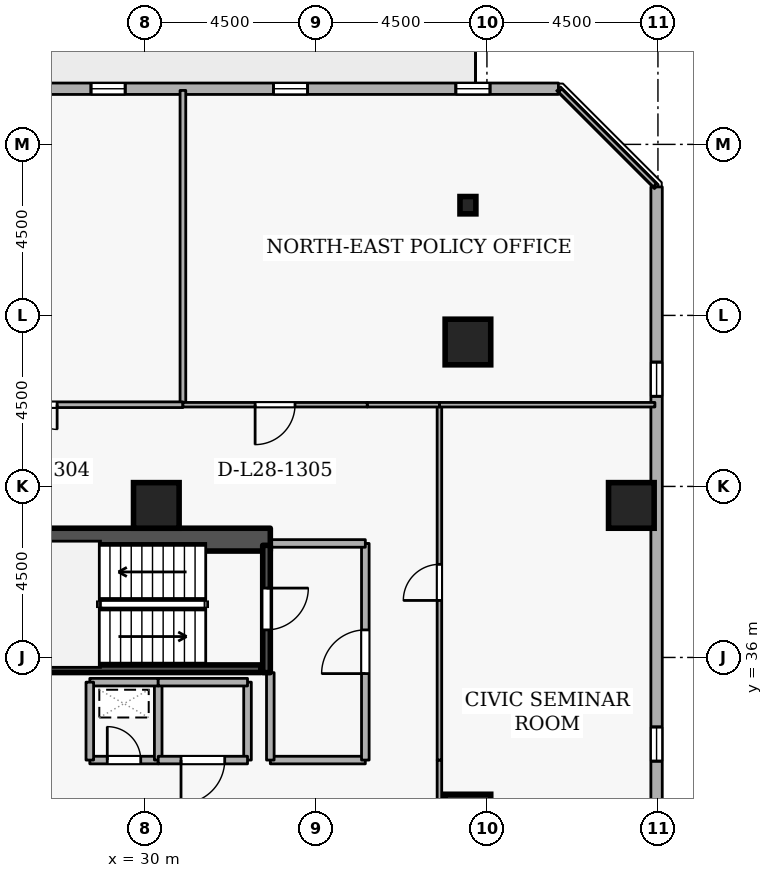
"""IFC4 building model, lengths in metres.
Left out: names, types, materials, properties, quantities, classifications, styles, units other than length and angle.
Written with IfcOpenShell. Run it as: python <this file> out.ifc"""

import sys

from ifc_helpers import new_model, si_unit, direction, frame, frame_2d, origin, origin_2d, place, context, subcontext, project, spatial, rectangle, i_section, extrude, element, fill, save


model = new_model("IFC4")
c1 = context("Model", 3, precision=1e-05, world=origin(), true_north=direction((0.0, 1.0)))
c2 = subcontext(c1, "Body", "Model", "MODEL_VIEW")
j1 = project(units=[si_unit("LENGTHUNIT", "METRE"), si_unit("PLANEANGLEUNIT", "RADIAN")], contexts=[c1])
p1 = place(None, origin())
s1 = spatial("IfcSite", under=j1, at=p1, CompositionType="ELEMENT")
p2 = place(p1, origin())
s2 = spatial("IfcBuilding", under=s1, at=p2, CompositionType="ELEMENT")
p3 = place(p2, frame((0.0, 0.0, 108.9)))
s3 = spatial("IfcBuildingStorey", under=s2, at=p3, CompositionType="ELEMENT", Elevation=108.9)
p4 = place(p3, frame((17.7, 39.1, 0.0), z_axis=(0.0, 0.0, 1.0), x_axis=(1.0, 0.0, 0.0)))
e1 = element("IfcWall", 1, at=p4, inside=s3, PredefinedType="SHEAR", context=c2, shape_type="SweptSolid", body=[
    extrude(rectangle(XDim=15.6, YDim=0.6, at=frame_2d((7.8, 0.0))), origin(), (0.0, 0.0, 1.0), 3.6),
])
for number, where, z_axis, x_axis in (
    (2, (42.8, 40.0, 0.0), (0.0, 0.0, 1.0), (1.0, 0.0, 0.0)),
    (3, (38.5, 44.3, 0.0), (0.0, 0.0, 1.0), (1.0, 0.0, 0.0)),
    (4, (38.5, 31.8, 0.0), (0.0, 0.0, 1.0), (1.0, 0.0, 0.0)),
    (5, (30.3, 40.0, 0.0), (0.0, 0.0, 1.0), (1.0, 0.0, 0.0)),
):
    element("IfcColumn", number, at=place(p3, frame(where, z_axis=z_axis, x_axis=x_axis)), inside=s3, PredefinedType="COLUMN", context=c2, shape_type="SweptSolid", body=[
        extrude(rectangle(XDim=1.2, YDim=1.2, at=origin_2d()), origin(), (0.0, 0.0, 1.0), 3.6),
    ])
p5 = place(p3, frame((38.5, 47.9, 0.0), z_axis=(0.0, 0.0, 1.0), x_axis=(1.0, 0.0, 0.0)))
e6 = element("IfcColumn", 6, at=p5, inside=s3, PredefinedType="COLUMN", context=c2, shape_type="SweptSolid", body=[
    extrude(i_section(OverallWidth=0.418, OverallDepth=0.456, WebThickness=0.042, FlangeThickness=0.067, FilletRadius=0.015, at=origin_2d()), origin(), (0.0, 0.0, 1.0), 3.6),
])
p6 = place(p3, frame((43.463, 12.271, 0.0), z_axis=(0.0, 0.0, 1.0), x_axis=(5.4088042e-05, 0.999999998537, 0.0)))
e7 = element("IfcWall", 7, at=p6, inside=s3, PredefinedType="STANDARD", context=c2, shape_type="SweptSolid", body=[
    extrude(rectangle(XDim=36.11, YDim=0.3, at=frame_2d((18.055, 0.0))), origin(), (0.0, 0.0, 1.0), 2.7),
])
p7 = place(p6, frame((6.6, 0.0, 0.72)))
e8 = element("IfcOpeningElement", 8, at=p7, cuts=e7, PredefinedType="OPENING", context=c2, shape_type="SweptSolid", body=[
    extrude(rectangle(XDim=0.9, YDim=1.75, at=frame_2d((0.45, 0.875))), frame((0.0, 0.16, 0.0), z_axis=(0.0, -1.0, 0.0), x_axis=(1.0, 0.0, 0.0)), (0.0, 0.0, 1.0), 0.32),
])
p8 = place(p6, frame((11.4, 0.0, 0.72)))
e9 = element("IfcOpeningElement", 9, at=p8, cuts=e7, PredefinedType="OPENING", context=c2, shape_type="SweptSolid", body=[
    extrude(rectangle(XDim=0.9, YDim=1.75, at=frame_2d((0.45, 0.875))), frame((0.0, 0.16, 0.0), z_axis=(0.0, -1.0, 0.0), x_axis=(1.0, 0.0, 0.0)), (0.0, 0.0, 1.0), 0.32),
])
p9 = place(p6, frame((16.2, 0.0, 0.72)))
e10 = element("IfcOpeningElement", 10, at=p9, cuts=e7, PredefinedType="OPENING", context=c2, shape_type="SweptSolid", body=[
    extrude(rectangle(XDim=0.9, YDim=1.75, at=frame_2d((0.45, 0.875))), frame((0.0, 0.16, 0.0), z_axis=(0.0, -1.0, 0.0), x_axis=(1.0, 0.0, 0.0)), (0.0, 0.0, 1.0), 0.32),
])
p10 = place(p6, frame((21.0, 0.0, 0.72)))
e11 = element("IfcOpeningElement", 11, at=p10, cuts=e7, PredefinedType="OPENING", context=c2, shape_type="SweptSolid", body=[
    extrude(rectangle(XDim=0.9, YDim=1.75, at=frame_2d((0.45, 0.875))), frame((0.0, 0.16, 0.0), z_axis=(0.0, -1.0, 0.0), x_axis=(1.0, 0.0, 0.0)), (0.0, 0.0, 1.0), 0.32),
])
p11 = place(p6, frame((30.6, 0.0, 0.72)))
e12 = element("IfcOpeningElement", 12, at=p11, cuts=e7, PredefinedType="OPENING", context=c2, shape_type="SweptSolid", body=[
    extrude(rectangle(XDim=0.9, YDim=1.75, at=frame_2d((0.45, 0.875))), frame((0.0, 0.16, 0.0), z_axis=(0.0, -1.0, 0.0), x_axis=(1.0, 0.0, 0.0)), (0.0, 0.0, 1.0), 0.32),
])
p12 = place(p3, frame((40.881, 50.965, 0.0), z_axis=(0.0, 0.0, 1.0), x_axis=(-0.999999998537, -5.4088042e-05, 0.0)))
e13 = element("IfcWall", 13, at=p12, inside=s3, PredefinedType="STANDARD", context=c2, shape_type="SweptSolid", body=[
    extrude(rectangle(XDim=36.11, YDim=0.3, at=frame_2d((18.055, 0.0))), origin(), (0.0, 0.0, 1.0), 2.7),
])
p13 = place(p12, frame((19.405, 0.0, 0.0)))
e14 = element("IfcOpeningElement", 14, at=p13, cuts=e13, PredefinedType="OPENING", context=c2, shape_type="SweptSolid", body=[
    extrude(rectangle(XDim=1.0, YDim=2.08, at=frame_2d((0.5, 1.04))), frame((0.0, 0.16, 0.0), z_axis=(0.0, -1.0, 0.0), x_axis=(1.0, 0.0, 0.0)), (0.0, 0.0, 1.0), 0.32),
])
p14 = place(p12, frame((1.8, 0.0, 0.72)))
e15 = element("IfcOpeningElement", 15, at=p14, cuts=e13, PredefinedType="OPENING", context=c2, shape_type="SweptSolid", body=[
    extrude(rectangle(XDim=0.9, YDim=1.75, at=frame_2d((0.45, 0.875))), frame((0.0, 0.16, 0.0), z_axis=(0.0, -1.0, 0.0), x_axis=(1.0, 0.0, 0.0)), (0.0, 0.0, 1.0), 0.32),
])
p15 = place(p12, frame((6.6, 0.0, 0.72)))
e16 = element("IfcOpeningElement", 16, at=p15, cuts=e13, PredefinedType="OPENING", context=c2, shape_type="SweptSolid", body=[
    extrude(rectangle(XDim=0.9, YDim=1.75, at=frame_2d((0.45, 0.875))), frame((0.0, 0.16, 0.0), z_axis=(0.0, -1.0, 0.0), x_axis=(1.0, 0.0, 0.0)), (0.0, 0.0, 1.0), 0.32),
])
p16 = place(p12, frame((11.4, 0.0, 0.72)))
e17 = element("IfcOpeningElement", 17, at=p16, cuts=e13, PredefinedType="OPENING", context=c2, shape_type="SweptSolid", body=[
    extrude(rectangle(XDim=0.9, YDim=1.75, at=frame_2d((0.45, 0.875))), frame((0.0, 0.16, 0.0), z_axis=(0.0, -1.0, 0.0), x_axis=(1.0, 0.0, 0.0)), (0.0, 0.0, 1.0), 0.32),
])
p17 = place(p12, frame((16.2, 0.0, 0.72)))
e18 = element("IfcOpeningElement", 18, at=p17, cuts=e13, PredefinedType="OPENING", context=c2, shape_type="SweptSolid", body=[
    extrude(rectangle(XDim=0.9, YDim=1.75, at=frame_2d((0.45, 0.875))), frame((0.0, 0.16, 0.0), z_axis=(0.0, -1.0, 0.0), x_axis=(1.0, 0.0, 0.0)), (0.0, 0.0, 1.0), 0.32),
])
p18 = place(p12, frame((25.8, 0.0, 0.72)))
e19 = element("IfcOpeningElement", 19, at=p18, cuts=e13, PredefinedType="OPENING", context=c2, shape_type="SweptSolid", body=[
    extrude(rectangle(XDim=0.9, YDim=1.75, at=frame_2d((0.45, 0.875))), frame((0.0, 0.16, 0.0), z_axis=(0.0, -1.0, 0.0), x_axis=(1.0, 0.0, 0.0)), (0.0, 0.0, 1.0), 0.32),
])
p19 = place(p12, frame((30.6, 0.0, 0.72)))
e20 = element("IfcOpeningElement", 20, at=p19, cuts=e13, PredefinedType="OPENING", context=c2, shape_type="SweptSolid", body=[
    extrude(rectangle(XDim=0.9, YDim=1.75, at=frame_2d((0.45, 0.875))), frame((0.0, 0.16, 0.0), z_axis=(0.0, -1.0, 0.0), x_axis=(1.0, 0.0, 0.0)), (0.0, 0.0, 1.0), 0.32),
])
p20 = place(p3, frame((33.2, 38.95, 0.0), z_axis=(0.0, 0.0, 1.0), x_axis=(0.0, -1.0, 0.0)))
e21 = element("IfcWall", 21, at=p20, inside=s3, PredefinedType="SHEAR", context=c2, shape_type="SweptSolid", body=[
    extrude(rectangle(XDim=3.35, YDim=0.2, at=frame_2d((1.675, 0.0))), origin(), (0.0, 0.0, 1.0), 3.6),
])
p21 = place(p20, frame((1.125, 0.0, 0.0)))
e22 = element("IfcOpeningElement", 22, at=p21, cuts=e21, PredefinedType="OPENING", context=c2, shape_type="SweptSolid", body=[
    extrude(rectangle(XDim=1.1, YDim=2.1, at=frame_2d((0.55, 1.05))), frame((0.0, 0.11, 0.0), z_axis=(0.0, -1.0, 0.0), x_axis=(1.0, 0.0, 0.0)), (0.0, 0.0, 1.0), 0.22),
])
p22 = place(p3, frame((25.95, 35.703, 0.0), z_axis=(0.0, 0.0, 1.0), x_axis=(1.0, 0.0, 0.0)))
e23 = element("IfcWall", 23, at=p22, inside=s3, PredefinedType="SHEAR", context=c2, shape_type="SweptSolid", body=[
    extrude(rectangle(XDim=7.1, YDim=0.2, at=frame_2d((3.55, 0.0))), origin(), (0.0, 0.0, 1.0), 3.6),
])
p23 = place(p3, frame((33.3, 33.3, 0.0), z_axis=(0.0, 0.0, 1.0), x_axis=(1.0, 0.0, 0.0)))
e24 = element("IfcWall", 24, at=p23, inside=s3, PredefinedType="STANDARD", context=c2, shape_type="SweptSolid", body=[
    extrude(rectangle(XDim=2.5, YDim=0.2, at=frame_2d((1.25, 0.0))), origin(), (0.0, 0.0, 1.0), 3.34),
])
p24 = place(p3, frame((35.8, 33.3, 0.0), z_axis=(0.0, 0.0, 1.0), x_axis=(0.0, 1.0, 0.0)))
e25 = element("IfcWall", 25, at=p24, inside=s3, PredefinedType="STANDARD", context=c2, shape_type="SweptSolid", body=[
    extrude(rectangle(XDim=5.7, YDim=0.2, at=frame_2d((2.85, 0.0))), origin(), (0.0, 0.0, 1.0), 3.34),
])
p25 = place(p24, frame((2.275, 0.0, 0.0)))
e26 = element("IfcOpeningElement", 26, at=p25, cuts=e25, PredefinedType="OPENING", context=c2, shape_type="SweptSolid", body=[
    extrude(rectangle(XDim=1.15, YDim=2.1, at=frame_2d((0.575, 1.05))), frame((0.0, 0.11, 0.0), z_axis=(0.0, -1.0, 0.0), x_axis=(1.0, 0.0, 0.0)), (0.0, 0.0, 1.0), 0.22),
])
p26 = place(p3, frame((35.8, 39.0, 0.0), z_axis=(0.0, 0.0, 1.0), x_axis=(-1.0, 0.0, 0.0)))
e27 = element("IfcWall", 27, at=p26, inside=s3, PredefinedType="STANDARD", context=c2, shape_type="SweptSolid", body=[
    extrude(rectangle(XDim=2.5, YDim=0.2, at=frame_2d((1.25, 0.0))), origin(), (0.0, 0.0, 1.0), 3.34),
])
p27 = place(p3, frame((33.3, 35.6, 0.0), z_axis=(0.0, 0.0, 1.0), x_axis=(0.0, -1.0, 0.0)))
e28 = element("IfcWall", 28, at=p27, inside=s3, PredefinedType="STANDARD", context=c2, shape_type="SweptSolid", body=[
    extrude(rectangle(XDim=2.3, YDim=0.2, at=frame_2d((1.15, 0.0))), origin(), (0.0, 0.0, 1.0), 2.545),
])
p28 = place(p3, frame((28.55, 33.3, 0.0), z_axis=(0.0, 0.0, 1.0), x_axis=(1.0, 0.0, 0.0)))
e29 = element("IfcWall", 29, at=p28, inside=s3, PredefinedType="STANDARD", context=c2, shape_type="SweptSolid", body=[
    extrude(rectangle(XDim=1.8, YDim=0.2, at=frame_2d((0.9, 0.0))), origin(), (0.0, 0.0, 1.0), 3.34),
])
p29 = place(p28, frame((0.46, 0.0, 0.0)))
e30 = element("IfcOpeningElement", 30, at=p29, cuts=e29, PredefinedType="OPENING", context=c2, shape_type="SweptSolid", body=[
    extrude(rectangle(XDim=0.88, YDim=2.04, at=frame_2d((0.44, 1.02))), frame((0.0, 0.11, 0.0), z_axis=(0.0, -1.0, 0.0), x_axis=(1.0, 0.0, 0.0)), (0.0, 0.0, 1.0), 0.22),
])
p30 = place(p3, frame((30.35, 33.3, 0.0), z_axis=(0.0, 0.0, 1.0), x_axis=(0.0, 1.0, 0.0)))
e31 = element("IfcWall", 31, at=p30, inside=s3, PredefinedType="STANDARD", context=c2, shape_type="SweptSolid", body=[
    extrude(rectangle(XDim=2.05, YDim=0.2, at=frame_2d((1.025, 0.0))), origin(), (0.0, 0.0, 1.0), 3.34),
])
p31 = place(p3, frame((30.35, 35.35, 0.0), z_axis=(0.0, 0.0, 1.0), x_axis=(-1.0, 0.0, 0.0)))
e32 = element("IfcWall", 32, at=p31, inside=s3, PredefinedType="STANDARD", context=c2, shape_type="SweptSolid", body=[
    extrude(rectangle(XDim=1.8, YDim=0.2, at=frame_2d((0.9, 0.0))), origin(), (0.0, 0.0, 1.0), 3.34),
])
p32 = place(p3, frame((28.55, 35.35, 0.0), z_axis=(0.0, 0.0, 1.0), x_axis=(0.0, -1.0, 0.0)))
e33 = element("IfcWall", 33, at=p32, inside=s3, PredefinedType="STANDARD", context=c2, shape_type="SweptSolid", body=[
    extrude(rectangle(XDim=2.05, YDim=0.2, at=frame_2d((1.025, 0.0))), origin(), (0.0, 0.0, 1.0), 3.34),
])
p33 = place(p3, frame((32.7, 35.35, 0.0), z_axis=(0.0, 0.0, 1.0), x_axis=(0.0, -1.0, 0.0)))
e34 = element("IfcWall", 34, at=p33, inside=s3, PredefinedType="STANDARD", context=c2, shape_type="SweptSolid", body=[
    extrude(rectangle(XDim=2.05, YDim=0.2, at=frame_2d((1.025, 0.0))), origin(), (0.0, 0.0, 1.0), 2.545),
])
p34 = place(p3, frame((32.7, 33.3, 0.0), z_axis=(0.0, 0.0, 1.0), x_axis=(-1.0, 0.0, 0.0)))
e35 = element("IfcWall", 35, at=p34, inside=s3, PredefinedType="STANDARD", context=c2, shape_type="SweptSolid", body=[
    extrude(rectangle(XDim=2.35, YDim=0.2, at=frame_2d((1.175, 0.0))), origin(), (0.0, 0.0, 1.0), 3.34),
])
p35 = place(p34, frame((0.6, 0.0, 0.0)))
e36 = element("IfcOpeningElement", 36, at=p35, cuts=e35, PredefinedType="OPENING", context=c2, shape_type="SweptSolid", body=[
    extrude(rectangle(XDim=1.15, YDim=2.1, at=frame_2d((0.575, 1.05))), frame((0.0, 0.11, 0.0), z_axis=(0.0, -1.0, 0.0), x_axis=(1.0, 0.0, 0.0)), (0.0, 0.0, 1.0), 0.22),
])
p36 = place(p3, frame((30.35, 35.35, 0.0), z_axis=(0.0, 0.0, 1.0), x_axis=(1.0, 0.0, 0.0)))
e37 = element("IfcWall", 37, at=p36, inside=s3, PredefinedType="STANDARD", context=c2, shape_type="SweptSolid", body=[
    extrude(rectangle(XDim=2.35, YDim=0.2, at=frame_2d((1.175, 0.0))), origin(), (0.0, 0.0, 1.0), 3.34),
])
p37 = place(p3, frame((37.75, 31.45, 0.0), z_axis=(0.0, 0.0, 1.0), x_axis=(0.0, 1.0, 0.0)))
e38 = element("IfcWall", 38, at=p37, inside=s3, PredefinedType="PARTITIONING", context=c2, shape_type="SweptSolid", body=[
    extrude(rectangle(XDim=1.85, YDim=0.12, at=frame_2d((0.925, 0.0))), origin(), (0.0, 0.0, 1.0), 3.34),
])
p38 = place(p3, frame((37.75, 33.3, 0.0), z_axis=(0.0, 0.0, 1.0), x_axis=(0.0, 1.0, 0.0)))
e39 = element("IfcWall", 39, at=p38, inside=s3, PredefinedType="PARTITIONING", context=c2, shape_type="SweptSolid", body=[
    extrude(rectangle(XDim=9.35, YDim=0.12, at=frame_2d((4.675, 0.0))), origin(), (0.0, 0.0, 1.0), 3.34),
])
p39 = place(p38, frame((4.2, 0.0, 0.0)))
e40 = element("IfcOpeningElement", 40, at=p39, cuts=e39, PredefinedType="OPENING", context=c2, shape_type="SweptSolid", body=[
    extrude(rectangle(XDim=0.95, YDim=2.1, at=frame_2d((0.475, 1.05))), frame((0.0, 0.07, 0.0), z_axis=(0.0, -1.0, 0.0), x_axis=(1.0, 0.0, 0.0)), (0.0, 0.0, 1.0), 0.14),
])
p40 = place(p3, frame((37.75, 42.65, 0.0), z_axis=(0.0, 0.0, 1.0), x_axis=(1.0, 0.0, 0.0)))
e41 = element("IfcWall", 41, at=p40, inside=s3, PredefinedType="PARTITIONING", context=c2, shape_type="SweptSolid", body=[
    extrude(rectangle(XDim=5.67, YDim=0.12, at=frame_2d((2.835, 0.0))), origin(), (0.0, 0.0, 1.0), 3.34),
])
p41 = place(p3, frame((31.0, 50.92, 0.0), z_axis=(0.0, 0.0, 1.0), x_axis=(0.0, -1.0, 0.0)))
e42 = element("IfcWall", 42, at=p41, inside=s3, PredefinedType="PARTITIONING", context=c2, shape_type="SweptSolid", body=[
    extrude(rectangle(XDim=8.27, YDim=0.15, at=frame_2d((4.135, 0.0))), origin(), (0.0, 0.0, 1.0), 3.34),
])
p42 = place(p3, frame((31.0, 42.65, 0.0), z_axis=(0.0, 0.0, 1.0), x_axis=(-1.0, 0.0, 0.0)))
e43 = element("IfcWall", 43, at=p42, inside=s3, PredefinedType="PARTITIONING", context=c2, shape_type="SweptSolid", body=[
    extrude(rectangle(XDim=11.0, YDim=0.15, at=frame_2d((5.5, 0.0))), origin(), (0.0, 0.0, 1.0), 3.34),
])
p43 = place(p42, frame((3.31, 0.0, 0.0)))
e44 = element("IfcOpeningElement", 44, at=p43, cuts=e43, PredefinedType="OPENING", context=c2, shape_type="SweptSolid", body=[
    extrude(rectangle(XDim=1.3, YDim=2.12, at=frame_2d((0.65, 1.06))), frame((0.0, 0.085, 0.0), z_axis=(0.0, -1.0, 0.0), x_axis=(1.0, 0.0, 0.0)), (0.0, 0.0, 1.0), 0.17),
])
p44 = place(p3, frame((37.75, 42.65, 0.0), z_axis=(0.0, 0.0, 1.0), x_axis=(-1.0, 0.0, 0.0)))
e45 = element("IfcWall", 45, at=p44, inside=s3, PredefinedType="PARTITIONING", context=c2, shape_type="SweptSolid", body=[
    extrude(rectangle(XDim=1.9, YDim=0.12, at=frame_2d((0.95, 0.0))), origin(), (0.0, 0.0, 1.0), 3.34),
])
p45 = place(p3, frame((35.85, 42.65, 0.0), z_axis=(0.0, 0.0, 1.0), x_axis=(-1.0, 0.0, 0.0)))
e46 = element("IfcWall", 46, at=p45, inside=s3, PredefinedType="PARTITIONING", context=c2, shape_type="SweptSolid", body=[
    extrude(rectangle(XDim=4.85, YDim=0.12, at=frame_2d((2.425, 0.0))), origin(), (0.0, 0.0, 1.0), 2.895),
])
p46 = place(p45, frame((1.9, 0.0, 0.0)))
e47 = element("IfcOpeningElement", 47, at=p46, cuts=e46, PredefinedType="OPENING", context=c2, shape_type="SweptSolid", body=[
    extrude(rectangle(XDim=1.05, YDim=2.1, at=frame_2d((0.525, 1.05))), frame((0.0, 0.07, 0.0), z_axis=(0.0, -1.0, 0.0), x_axis=(1.0, 0.0, 0.0)), (0.0, 0.0, 1.0), 0.14),
])
p47 = place(p3, frame((40.925, 50.92, 0.0), z_axis=(0.0, 0.0, 1.0), x_axis=(0.707106781187, -0.707106781187, 0.0)))
e48 = element("IfcWall", 48, at=p47, inside=s3, PredefinedType="PARTITIONING", context=c2, shape_type="SweptSolid", body=[
    extrude(rectangle(XDim=3.528, YDim=0.12, at=frame_2d((1.764, 0.0))), origin(), (0.0, 0.0, 1.0), 3.34),
])
p48 = place(p10, origin())
e49 = element("IfcWindow", 49, at=p48, inside=s3, PartitioningType="SINGLE_PANEL", PredefinedType="WINDOW", context=c2, shape_type="SweptSolid", body=[
    extrude(rectangle(XDim=0.9, YDim=1.75, at=frame_2d((0.45, 0.875))), frame((0.0, 0.03, 0.0), z_axis=(0.0, -1.0, 0.0), x_axis=(1.0, 0.0, 0.0)), (0.0, 0.0, 1.0), 0.06),
])
fill(e11, e49)
p49 = place(p11, origin())
e50 = element("IfcWindow", 50, at=p49, inside=s3, PartitioningType="SINGLE_PANEL", PredefinedType="WINDOW", context=c2, shape_type="SweptSolid", body=[
    extrude(rectangle(XDim=0.9, YDim=1.75, at=frame_2d((0.45, 0.875))), frame((0.0, 0.03, 0.0), z_axis=(0.0, -1.0, 0.0), x_axis=(1.0, 0.0, 0.0)), (0.0, 0.0, 1.0), 0.06),
])
fill(e12, e50)
p50 = place(p14, origin())
e51 = element("IfcWindow", 51, at=p50, inside=s3, PartitioningType="SINGLE_PANEL", PredefinedType="WINDOW", context=c2, shape_type="SweptSolid", body=[
    extrude(rectangle(XDim=0.9, YDim=1.75, at=frame_2d((0.45, 0.875))), frame((0.0, 0.03, 0.0), z_axis=(0.0, -1.0, 0.0), x_axis=(1.0, 0.0, 0.0)), (0.0, 0.0, 1.0), 0.06),
])
fill(e15, e51)
p51 = place(p15, origin())
e52 = element("IfcWindow", 52, at=p51, inside=s3, PartitioningType="SINGLE_PANEL", PredefinedType="WINDOW", context=c2, shape_type="SweptSolid", body=[
    extrude(rectangle(XDim=0.9, YDim=1.75, at=frame_2d((0.45, 0.875))), frame((0.0, 0.03, 0.0), z_axis=(0.0, -1.0, 0.0), x_axis=(1.0, 0.0, 0.0)), (0.0, 0.0, 1.0), 0.06),
])
fill(e16, e52)
p52 = place(p16, origin())
e53 = element("IfcWindow", 53, at=p52, inside=s3, PartitioningType="SINGLE_PANEL", PredefinedType="WINDOW", context=c2, shape_type="SweptSolid", body=[
    extrude(rectangle(XDim=0.9, YDim=1.75, at=frame_2d((0.45, 0.875))), frame((0.0, 0.03, 0.0), z_axis=(0.0, -1.0, 0.0), x_axis=(1.0, 0.0, 0.0)), (0.0, 0.0, 1.0), 0.06),
])
fill(e17, e53)
p53 = place(p21, origin())
e54 = element("IfcDoor", 54, at=p53, inside=s3, OperationType="SINGLE_SWING_LEFT", PredefinedType="DOOR", context=c2, shape_type="SweptSolid", body=[
    extrude(rectangle(XDim=1.1, YDim=2.1, at=frame_2d((0.55, 1.05))), frame((0.0, 0.025, 0.0), z_axis=(0.0, -1.0, 0.0), x_axis=(1.0, 0.0, 0.0)), (0.0, 0.0, 1.0), 0.05),
])
fill(e22, e54)
p54 = place(p25, origin())
e55 = element("IfcDoor", 55, at=p54, inside=s3, OperationType="SINGLE_SWING_LEFT", PredefinedType="DOOR", context=c2, shape_type="SweptSolid", body=[
    extrude(rectangle(XDim=1.15, YDim=2.1, at=frame_2d((0.575, 1.05))), frame((0.0, 0.025, 0.0), z_axis=(0.0, -1.0, 0.0), x_axis=(1.0, 0.0, 0.0)), (0.0, 0.0, 1.0), 0.05),
])
fill(e26, e55)
p55 = place(p29, origin())
e56 = element("IfcDoor", 56, at=p55, inside=s3, OperationType="SINGLE_SWING_LEFT", PredefinedType="DOOR", context=c2, shape_type="SweptSolid", body=[
    extrude(rectangle(XDim=0.88, YDim=2.04, at=frame_2d((0.44, 1.02))), frame((0.0, 0.025, 0.0), z_axis=(0.0, -1.0, 0.0), x_axis=(1.0, 0.0, 0.0)), (0.0, 0.0, 1.0), 0.05),
])
fill(e30, e56)
p56 = place(p35, origin())
e57 = element("IfcDoor", 57, at=p56, inside=s3, OperationType="SINGLE_SWING_RIGHT", PredefinedType="DOOR", context=c2, shape_type="SweptSolid", body=[
    extrude(rectangle(XDim=1.15, YDim=2.1, at=frame_2d((0.575, 1.05))), frame((0.0, 0.025, 0.0), z_axis=(0.0, -1.0, 0.0), x_axis=(1.0, 0.0, 0.0)), (0.0, 0.0, 1.0), 0.05),
])
fill(e36, e57)
p57 = place(p39, origin())
e58 = element("IfcDoor", 58, at=p57, inside=s3, OperationType="SINGLE_SWING_LEFT", PredefinedType="DOOR", context=c2, shape_type="SweptSolid", body=[
    extrude(rectangle(XDim=0.95, YDim=2.1, at=frame_2d((0.475, 1.05))), frame((0.0, 0.025, 0.0), z_axis=(0.0, -1.0, 0.0), x_axis=(1.0, 0.0, 0.0)), (0.0, 0.0, 1.0), 0.05),
])
fill(e40, e58)
p58 = place(p43, origin())
e59 = element("IfcDoor", 59, at=p58, inside=s3, OperationType="DOUBLE_DOOR_SINGLE_SWING", PredefinedType="DOOR", context=c2, shape_type="SweptSolid", body=[
    extrude(rectangle(XDim=1.3, YDim=2.12, at=frame_2d((0.65, 1.06))), frame((0.0, 0.025, 0.0), z_axis=(0.0, -1.0, 0.0), x_axis=(1.0, 0.0, 0.0)), (0.0, 0.0, 1.0), 0.05),
])
fill(e44, e59)
p59 = place(p46, origin())
e60 = element("IfcDoor", 60, at=p59, inside=s3, OperationType="SINGLE_SWING_RIGHT", PredefinedType="DOOR", context=c2, shape_type="SweptSolid", body=[
    extrude(rectangle(XDim=1.05, YDim=2.1, at=frame_2d((0.525, 1.05))), frame((0.0, 0.025, 0.0), z_axis=(0.0, -1.0, 0.0), x_axis=(1.0, 0.0, 0.0)), (0.0, 0.0, 1.0), 0.05),
])
fill(e47, e60)
save(model, sys.argv[1])
